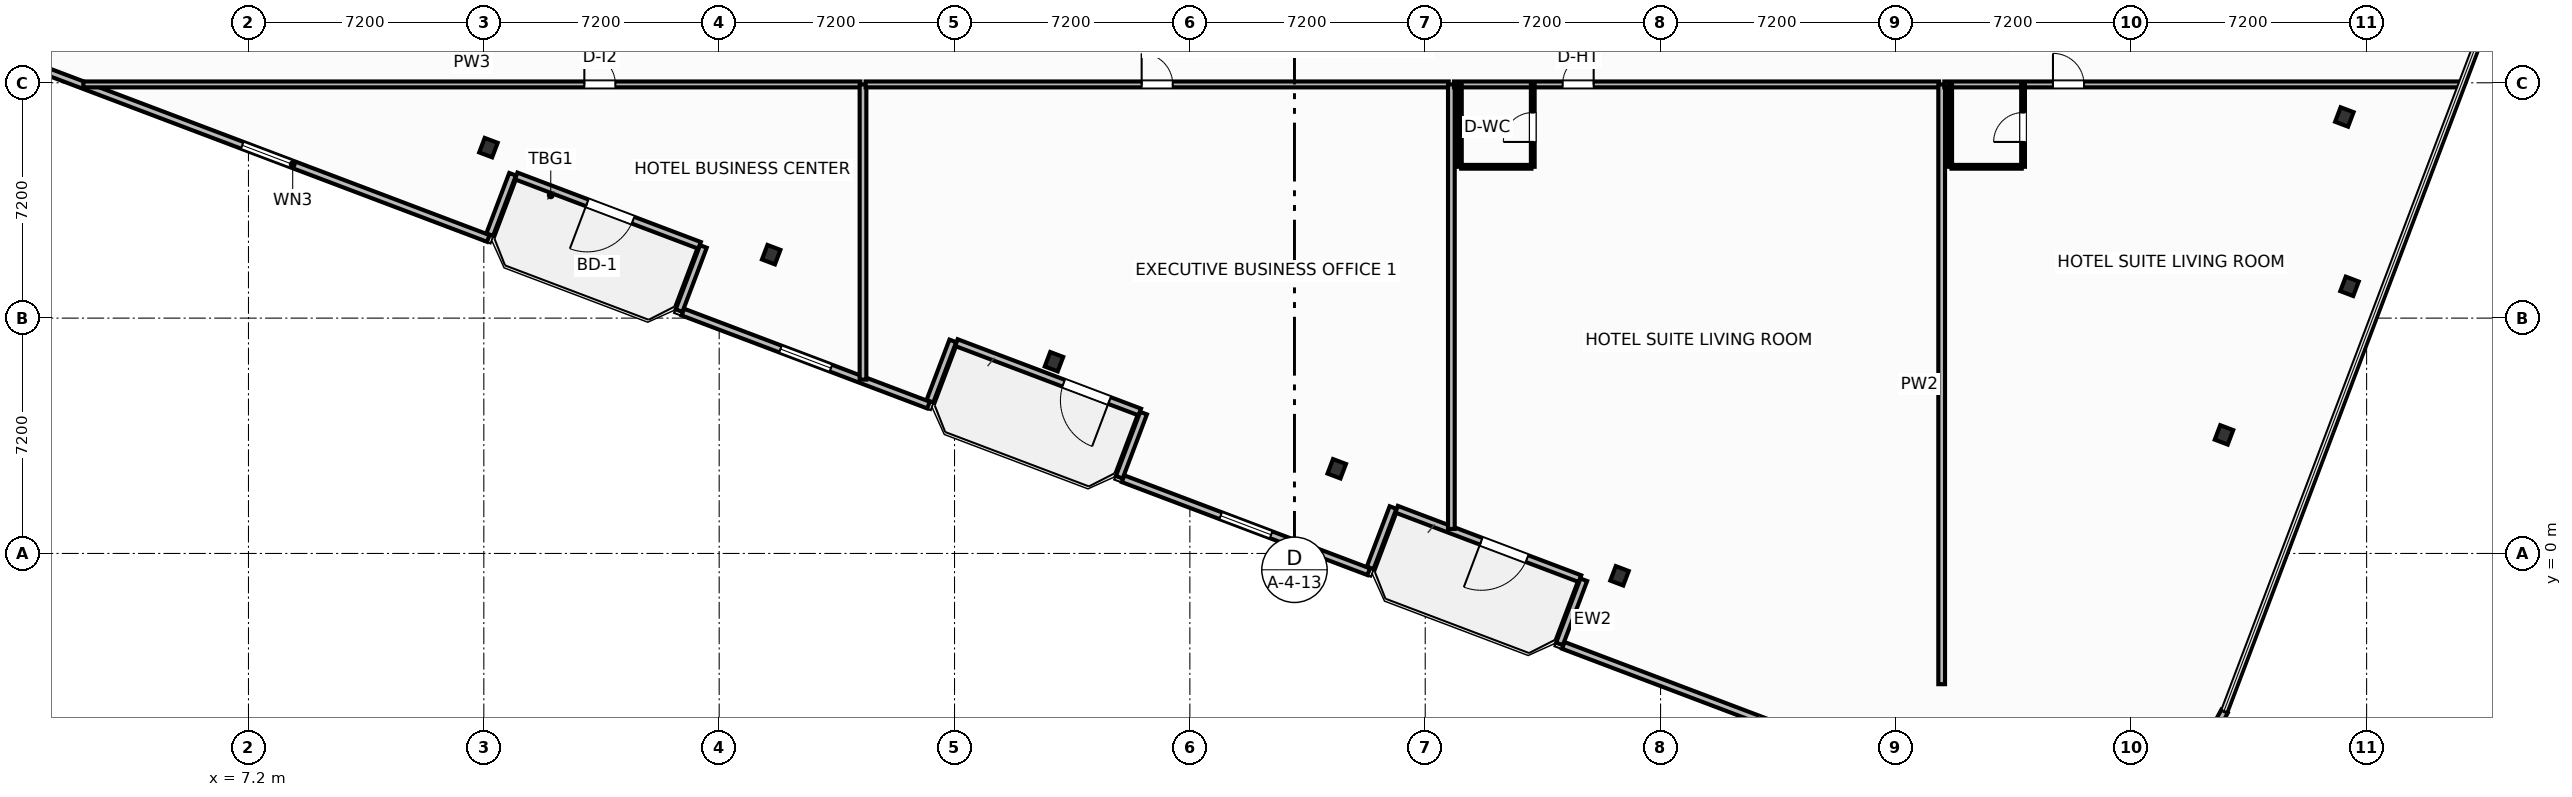
"""IFC4 building model, lengths in metres.
Left out: names, types, materials, properties, quantities, classifications, styles, units other than length and angle.
Written with IfcOpenShell. Run it as: python <this file> out.ifc"""

import sys

from ifc_helpers import new_model, si_unit, direction, frame, frame_2d, origin, origin_2d, place, context, subcontext, project, spatial, rectangle, i_section, extrude, element, fill, save


model = new_model("IFC4")
c1 = context("Model", 3, precision=1e-05, world=origin(), true_north=direction((0.0, 1.0)))
c2 = subcontext(c1, "Body", "Model", "MODEL_VIEW")
j1 = project(units=[si_unit("LENGTHUNIT", "METRE"), si_unit("PLANEANGLEUNIT", "RADIAN")], contexts=[c1])
p1 = place(None, origin())
s1 = spatial("IfcSite", under=j1, at=p1, CompositionType="ELEMENT")
p2 = place(p1, origin())
s2 = spatial("IfcBuilding", under=s1, at=p2, CompositionType="ELEMENT")
p3 = place(p2, frame((0.0, 0.0, 91.0)))
s3 = spatial("IfcBuildingStorey", under=s2, at=p3, CompositionType="ELEMENT", Elevation=91.0)
for number, where, z_axis, x_axis in (
    (1, (14.541, 12.416, 0.0), (0.0, 0.0, 1.0), (0.935, -0.354, 0.0)),
    (2, (23.192, 9.141, 0.0), (0.0, 0.0, 1.0), (0.935, -0.354, 0.0)),
    (3, (31.843, 5.866, 0.0), (0.0, 0.0, 1.0), (0.935, -0.354, 0.0)),
    (4, (40.493, 2.591, 0.0), (0.0, 0.0, 1.0), (0.935, -0.354, 0.0)),
    (5, (49.144, -0.684, 0.0), (0.0, 0.0, 1.0), (0.935, -0.354, 0.0)),
    (6, (67.637, 3.628, 0.0), (0.0, 0.0, 1.0), (0.935, -0.354, 0.0)),
    (7, (71.477, 8.173, 0.0), (0.0, 0.0, 1.0), (0.935, -0.354, 0.0)),
    (8, (71.319, 13.354, 0.0), (0.0, 0.0, 1.0), (0.935, -0.354, 0.0)),
):
    element("IfcColumn", number, at=place(p3, frame(where, z_axis=z_axis, x_axis=x_axis)), inside=s3, PredefinedType="COLUMN", context=c2, shape_type="SweptSolid", body=[
        extrude(i_section(OverallWidth=0.424, OverallDepth=0.474, WebThickness=0.048, FlangeThickness=0.077, FilletRadius=0.025, at=origin_2d()), origin(), (0.0, 0.0, 1.0), 3.7),
    ])
p4 = place(p3, frame((21.0, 9.425, 0.0), z_axis=(0.0, 0.0, 1.0), x_axis=(-0.93521416643, 0.354082565101, 0.0)))
e9 = element("IfcWall", 9, at=p4, inside=s3, PredefinedType="SOLIDWALL", context=c2, shape_type="SweptSolid", body=[
    extrude(rectangle(XDim=6.0, YDim=0.22, at=frame_2d((3.0, 0.0))), origin(), (0.0, 0.0, 1.0), 2.73),
])
p5 = place(p4, frame((2.176, 0.0, 0.0)))
e10 = element("IfcOpeningElement", 10, at=p5, cuts=e9, PredefinedType="OPENING", context=c2, shape_type="SweptSolid", body=[
    extrude(rectangle(XDim=1.5, YDim=2.25, at=frame_2d((0.75, 1.125))), frame((0.0, 0.12, 0.0), z_axis=(0.0, -1.0, 0.0), x_axis=(1.0, 0.0, 0.0)), (0.0, 0.0, 1.0), 0.24),
])
p6 = place(p3, frame((34.468, 4.327, 0.0), z_axis=(0.0, 0.0, 1.0), x_axis=(-0.9352192676, 0.354069091436, 0.0)))
e11 = element("IfcWall", 11, at=p6, inside=s3, PredefinedType="SOLIDWALL", context=c2, shape_type="SweptSolid", body=[
    extrude(rectangle(XDim=6.0, YDim=0.22, at=frame_2d((3.0, 0.0))), origin(), (0.0, 0.0, 1.0), 2.73),
])
p7 = place(p6, frame((0.992, 0.0, 0.0)))
e12 = element("IfcOpeningElement", 12, at=p7, cuts=e11, PredefinedType="OPENING", context=c2, shape_type="SweptSolid", body=[
    extrude(rectangle(XDim=1.5, YDim=2.25, at=frame_2d((0.75, 1.125))), frame((0.0, 0.12, 0.0), z_axis=(0.0, -1.0, 0.0), x_axis=(1.0, 0.0, 0.0)), (0.0, 0.0, 1.0), 0.24),
])
p8 = place(p3, frame((47.935, -0.771, 0.0), z_axis=(0.0, 0.0, 1.0), x_axis=(-0.935227640088, 0.354046976001, 0.0)))
e13 = element("IfcWall", 13, at=p8, inside=s3, PredefinedType="SOLIDWALL", context=c2, shape_type="SweptSolid", body=[
    extrude(rectangle(XDim=6.0, YDim=0.22, at=frame_2d((3.0, 0.0))), origin(), (0.0, 0.0, 1.0), 2.73),
])
p9 = place(p8, frame((1.732, 0.0, 0.0)))
e14 = element("IfcOpeningElement", 14, at=p9, cuts=e13, PredefinedType="OPENING", context=c2, shape_type="SweptSolid", body=[
    extrude(rectangle(XDim=1.5, YDim=2.25, at=frame_2d((0.75, 1.125))), frame((0.0, 0.12, 0.0), z_axis=(0.0, -1.0, 0.0), x_axis=(1.0, 0.0, 0.0)), (0.0, 0.0, 1.0), 0.24),
])
p10 = place(p3, frame((1.026, 14.753, 0.0), z_axis=(0.0, 0.0, 1.0), x_axis=(0.935222448475, -0.354060689526, 0.0)))
e15 = element("IfcWall", 15, at=p10, inside=s3, PredefinedType="SOLIDWALL", context=c2, shape_type="SweptSolid", body=[
    extrude(rectangle(XDim=14.447, YDim=0.22, at=frame_2d((7.224, 0.0))), origin(), (0.0, 0.0, 1.0), 2.73),
])
p11 = place(p10, frame((6.399, 0.0, 0.8)))
e16 = element("IfcOpeningElement", 16, at=p11, cuts=e15, PredefinedType="OPENING", context=c2, shape_type="SweptSolid", body=[
    extrude(rectangle(XDim=1.65, YDim=1.65, at=frame_2d((0.825, 0.825))), frame((0.0, 0.12, 0.0), z_axis=(0.0, -1.0, 0.0), x_axis=(1.0, 0.0, 0.0)), (0.0, 0.0, 1.0), 0.24),
])
p12 = place(p3, frame((14.581, 9.755, 0.0), z_axis=(0.0, 0.0, 1.0), x_axis=(0.354061611705, 0.935222099352, 0.0)))
e17 = element("IfcWall", 17, at=p12, inside=s3, PredefinedType="SOLIDWALL", context=c2, shape_type="SweptSolid", body=[
    extrude(rectangle(XDim=1.975, YDim=0.22, at=frame_2d((0.987, 0.0))), origin(), (0.0, 0.0, 1.0), 2.73),
])
p13 = place(p3, frame((21.116, 9.392, 0.0), z_axis=(0.0, 0.0, 1.0), x_axis=(-0.353988291547, -0.935249854022, 0.0)))
e18 = element("IfcWall", 18, at=p13, inside=s3, PredefinedType="SOLIDWALL", context=c2, shape_type="SweptSolid", body=[
    extrude(rectangle(XDim=2.1, YDim=0.22, at=frame_2d((1.05, 0.0))), origin(), (0.0, 0.0, 1.0), 2.73),
])
p14 = place(p3, frame((20.49, 7.384, 0.0), z_axis=(0.0, 0.0, 1.0), x_axis=(0.935230796934, -0.354038636968, 0.0)))
e19 = element("IfcWall", 19, at=p14, inside=s3, PredefinedType="SOLIDWALL", context=c2, shape_type="SweptSolid", body=[
    extrude(rectangle(XDim=8.035, YDim=0.22, at=frame_2d((4.018, 0.0))), origin(), (0.0, 0.0, 1.0), 2.73),
])
p15 = place(p14, frame((3.192, 0.0, 0.8)))
e20 = element("IfcOpeningElement", 20, at=p15, cuts=e19, PredefinedType="OPENING", context=c2, shape_type="SweptSolid", body=[
    extrude(rectangle(XDim=1.65, YDim=1.65, at=frame_2d((0.825, 0.825))), frame((0.0, 0.12, 0.0), z_axis=(0.0, -1.0, 0.0), x_axis=(1.0, 0.0, 0.0)), (0.0, 0.0, 1.0), 0.24),
])
p16 = place(p3, frame((28.048, 4.656, 0.0), z_axis=(0.0, 0.0, 1.0), x_axis=(0.354128791944, 0.935196663123, 0.0)))
e21 = element("IfcWall", 21, at=p16, inside=s3, PredefinedType="SOLIDWALL", context=c2, shape_type="SweptSolid", body=[
    extrude(rectangle(XDim=1.975, YDim=0.22, at=frame_2d((0.988, 0.0))), origin(), (0.0, 0.0, 1.0), 2.73),
])
p17 = place(p3, frame((34.583, 4.294, 0.0), z_axis=(0.0, 0.0, 1.0), x_axis=(-0.354128469405, -0.935196785258, 0.0)))
e22 = element("IfcWall", 22, at=p17, inside=s3, PredefinedType="SOLIDWALL", context=c2, shape_type="SweptSolid", body=[
    extrude(rectangle(XDim=2.1, YDim=0.22, at=frame_2d((1.05, 0.0))), origin(), (0.0, 0.0, 1.0), 2.73),
])
p18 = place(p3, frame((33.957, 2.286, 0.0), z_axis=(0.0, 0.0, 1.0), x_axis=(0.935220736163, -0.354065212427, 0.0)))
e23 = element("IfcWall", 23, at=p18, inside=s3, PredefinedType="SOLIDWALL", context=c2, shape_type="SweptSolid", body=[
    extrude(rectangle(XDim=8.035, YDim=0.22, at=frame_2d((4.018, 0.0))), origin(), (0.0, 0.0, 1.0), 2.73),
])
p19 = place(p18, frame((3.192, 0.0, 0.8)))
e24 = element("IfcOpeningElement", 24, at=p19, cuts=e23, PredefinedType="OPENING", context=c2, shape_type="SweptSolid", body=[
    extrude(rectangle(XDim=1.65, YDim=1.65, at=frame_2d((0.825, 0.825))), frame((0.0, 0.12, 0.0), z_axis=(0.0, -1.0, 0.0), x_axis=(1.0, 0.0, 0.0)), (0.0, 0.0, 1.0), 0.24),
])
p20 = place(p3, frame((41.516, -0.442, 0.0), z_axis=(0.0, 0.0, 1.0), x_axis=(0.354061611705, 0.935222099352, 0.0)))
e25 = element("IfcWall", 25, at=p20, inside=s3, PredefinedType="SOLIDWALL", context=c2, shape_type="SweptSolid", body=[
    extrude(rectangle(XDim=1.975, YDim=0.22, at=frame_2d((0.987, 0.0))), origin(), (0.0, 0.0, 1.0), 2.73),
])
p21 = place(p3, frame((48.051, -0.805, 0.0), z_axis=(0.0, 0.0, 1.0), x_axis=(-0.353988291547, -0.935249854022, 0.0)))
e26 = element("IfcWall", 26, at=p21, inside=s3, PredefinedType="SOLIDWALL", context=c2, shape_type="SweptSolid", body=[
    extrude(rectangle(XDim=2.1, YDim=0.22, at=frame_2d((1.05, 0.0))), origin(), (0.0, 0.0, 1.0), 2.73),
])
p22 = place(p3, frame((47.424, -2.813, 0.0), z_axis=(0.0, 0.0, 1.0), x_axis=(0.935225962032, -0.354051408614, 0.0)))
e27 = element("IfcWall", 27, at=p22, inside=s3, PredefinedType="SOLIDWALL", context=c2, shape_type="SweptSolid", body=[
    extrude(rectangle(XDim=14.347, YDim=0.22, at=frame_2d((7.173, 0.0))), origin(), (0.0, 0.0, 1.0), 2.73),
])
p23 = place(p22, frame((6.348, 0.0, 0.8)))
e28 = element("IfcOpeningElement", 28, at=p23, cuts=e27, PredefinedType="OPENING", context=c2, shape_type="SweptSolid", body=[
    extrude(rectangle(XDim=1.65, YDim=1.65, at=frame_2d((0.825, 0.825))), frame((0.0, 0.12, 0.0), z_axis=(0.0, -1.0, 0.0), x_axis=(1.0, 0.0, 0.0)), (0.0, 0.0, 1.0), 0.24),
])
p24 = place(p3, frame((67.015, -6.019, 0.0), z_axis=(0.0, 0.0, 1.0), x_axis=(0.473077364598, 0.881020889142, 0.0)))
e29 = element("IfcWall", 29, at=p24, inside=s3, PredefinedType="SOLIDWALL", context=c2, shape_type="SweptSolid", body=[
    extrude(rectangle(XDim=1.353, YDim=0.22, at=frame_2d((0.677, 0.0))), origin(), (0.0, 0.0, 1.0), 2.73),
])
p25 = place(p3, frame((2.146, 14.35, 0.0), z_axis=(0.0, 0.0, 1.0), x_axis=(1.0, 0.0, 0.0)))
e30 = element("IfcWall", 30, at=p25, inside=s3, PredefinedType="PARTITIONING", context=c2, shape_type="SweptSolid", body=[
    extrude(rectangle(XDim=23.774, YDim=0.18, at=frame_2d((11.887, 0.0))), origin(), (0.0, 0.0, 1.0), 3.45),
])
p26 = place(p25, frame((15.329, 0.0, 0.0)))
e31 = element("IfcOpeningElement", 31, at=p26, cuts=e30, PredefinedType="OPENING", context=c2, shape_type="SweptSolid", body=[
    extrude(rectangle(XDim=0.95, YDim=2.05, at=frame_2d((0.475, 1.025))), frame((0.0, 0.1, 0.0), z_axis=(0.0, -1.0, 0.0), x_axis=(1.0, 0.0, 0.0)), (0.0, 0.0, 1.0), 0.2),
])
p27 = place(p3, frame((26.0, 5.319, 0.0), z_axis=(0.0, 0.0, 1.0), x_axis=(0.0, 1.0, 0.0)))
e32 = element("IfcWall", 32, at=p27, inside=s3, PredefinedType="PARTITIONING", context=c2, shape_type="SweptSolid", body=[
    extrude(rectangle(XDim=9.031, YDim=0.205, at=frame_2d((4.515, 0.0))), origin(), (0.0, 0.0, 1.0), 3.45),
])
p28 = place(p3, frame((26.08, 14.35, 0.0), z_axis=(0.0, 0.0, 1.0), x_axis=(1.0, 0.0, 0.0)))
e33 = element("IfcWall", 33, at=p28, inside=s3, PredefinedType="PARTITIONING", context=c2, shape_type="SweptSolid", body=[
    extrude(rectangle(XDim=17.84, YDim=0.18, at=frame_2d((8.92, 0.0))), origin(), (0.0, 0.0, 1.0), 3.45),
])
p29 = place(p28, frame((8.445, 0.0, 0.0)))
e34 = element("IfcOpeningElement", 34, at=p29, cuts=e33, PredefinedType="OPENING", context=c2, shape_type="SweptSolid", body=[
    extrude(rectangle(XDim=0.95, YDim=2.05, at=frame_2d((0.475, 1.025))), frame((0.0, 0.1, 0.0), z_axis=(0.0, -1.0, 0.0), x_axis=(1.0, 0.0, 0.0)), (0.0, 0.0, 1.0), 0.2),
])
p30 = place(p3, frame((44.0, 0.75, 0.0), z_axis=(0.0, 0.0, 1.0), x_axis=(0.0, 1.0, 0.0)))
e35 = element("IfcWall", 35, at=p30, inside=s3, PredefinedType="PARTITIONING", context=c2, shape_type="SweptSolid", body=[
    extrude(rectangle(XDim=13.6, YDim=0.205, at=frame_2d((6.8, 0.0))), origin(), (0.0, 0.0, 1.0), 3.45),
])
p31 = place(p3, frame((44.08, 14.35, 0.0), z_axis=(0.0, 0.0, 1.0), x_axis=(1.0, 0.0, 0.0)))
e36 = element("IfcWall", 36, at=p31, inside=s3, PredefinedType="PARTITIONING", context=c2, shape_type="SweptSolid", body=[
    extrude(rectangle(XDim=14.84, YDim=0.18, at=frame_2d((7.42, 0.0))), origin(), (0.0, 0.0, 1.0), 3.45),
])
p32 = place(p31, frame((3.323, 0.0, 0.0)))
e37 = element("IfcOpeningElement", 37, at=p32, cuts=e36, PredefinedType="OPENING", context=c2, shape_type="SweptSolid", body=[
    extrude(rectangle(XDim=0.95, YDim=2.15, at=frame_2d((0.475, 1.075))), frame((0.0, 0.1, 0.0), z_axis=(0.0, -1.0, 0.0), x_axis=(1.0, 0.0, 0.0)), (0.0, 0.0, 1.0), 0.2),
])
p33 = place(p3, frame((44.3, 11.83, 0.0), z_axis=(0.0, 0.0, 1.0), x_axis=(1.0, 0.0, 0.0)))
e38 = element("IfcWall", 38, at=p33, inside=s3, PredefinedType="PARTITIONING", context=c2, shape_type="SweptSolid", body=[
    extrude(rectangle(XDim=2.15, YDim=0.115, at=frame_2d((1.075, 0.0))), origin(), (0.0, 0.0, 1.0), 3.45),
])
p34 = place(p3, frame((46.49, 11.83, 0.0), z_axis=(0.0, 0.0, 1.0), x_axis=(0.0, 1.0, 0.0)))
e39 = element("IfcWall", 39, at=p34, inside=s3, PredefinedType="PARTITIONING", context=c2, shape_type="SweptSolid", body=[
    extrude(rectangle(XDim=2.52, YDim=0.115, at=frame_2d((1.26, 0.0))), origin(), (0.0, 0.0, 1.0), 3.45),
])
p35 = place(p34, frame((0.76, 0.0, 0.0)))
e40 = element("IfcOpeningElement", 40, at=p35, cuts=e39, PredefinedType="OPENING", context=c2, shape_type="SweptSolid", body=[
    extrude(rectangle(XDim=0.9, YDim=2.05, at=frame_2d((0.45, 1.025))), frame((0.0, 0.067, 0.0), z_axis=(0.0, -1.0, 0.0), x_axis=(1.0, 0.0, 0.0)), (0.0, 0.0, 1.0), 0.135),
])
p36 = place(p3, frame((44.26, 11.83, 0.0), z_axis=(0.0, 0.0, 1.0), x_axis=(0.0, 1.0, 0.0)))
e41 = element("IfcWall", 41, at=p36, inside=s3, PredefinedType="PARTITIONING", context=c2, shape_type="SweptSolid", body=[
    extrude(rectangle(XDim=2.52, YDim=0.115, at=frame_2d((1.26, 0.0))), origin(), (0.0, 0.0, 1.0), 3.45),
])
p37 = place(p3, frame((59.0, -4.0, 0.0), z_axis=(0.0, 0.0, 1.0), x_axis=(0.0, 1.0, 0.0)))
e42 = element("IfcWall", 42, at=p37, inside=s3, PredefinedType="PARTITIONING", context=c2, shape_type="SweptSolid", body=[
    extrude(rectangle(XDim=18.35, YDim=0.205, at=frame_2d((9.175, 0.0))), origin(), (0.0, 0.0, 1.0), 3.45),
])
p38 = place(p3, frame((59.08, 14.35, 0.0), z_axis=(0.0, 0.0, 1.0), x_axis=(1.0, 0.0, 0.0)))
e43 = element("IfcWall", 43, at=p38, inside=s3, PredefinedType="PARTITIONING", context=c2, shape_type="SweptSolid", body=[
    extrude(rectangle(XDim=15.775, YDim=0.18, at=frame_2d((7.888, 0.0))), origin(), (0.0, 0.0, 1.0), 2.58),
])
p39 = place(p38, frame((3.324, 0.0, 0.0)))
e44 = element("IfcOpeningElement", 44, at=p39, cuts=e43, PredefinedType="OPENING", context=c2, shape_type="SweptSolid", body=[
    extrude(rectangle(XDim=0.95, YDim=2.15, at=frame_2d((0.475, 1.075))), frame((0.0, 0.1, 0.0), z_axis=(0.0, -1.0, 0.0), x_axis=(1.0, 0.0, 0.0)), (0.0, 0.0, 1.0), 0.2),
])
p40 = place(p3, frame((59.3, 11.83, 0.0), z_axis=(0.0, 0.0, 1.0), x_axis=(1.0, 0.0, 0.0)))
e45 = element("IfcWall", 45, at=p40, inside=s3, PredefinedType="PARTITIONING", context=c2, shape_type="SweptSolid", body=[
    extrude(rectangle(XDim=2.15, YDim=0.115, at=frame_2d((1.075, 0.0))), origin(), (0.0, 0.0, 1.0), 3.45),
])
p41 = place(p3, frame((61.49, 11.83, 0.0), z_axis=(0.0, 0.0, 1.0), x_axis=(0.0, 1.0, 0.0)))
e46 = element("IfcWall", 46, at=p41, inside=s3, PredefinedType="PARTITIONING", context=c2, shape_type="SweptSolid", body=[
    extrude(rectangle(XDim=2.52, YDim=0.115, at=frame_2d((1.26, 0.0))), origin(), (0.0, 0.0, 1.0), 3.45),
])
p42 = place(p41, frame((0.76, 0.0, 0.0)))
e47 = element("IfcOpeningElement", 47, at=p42, cuts=e46, PredefinedType="OPENING", context=c2, shape_type="SweptSolid", body=[
    extrude(rectangle(XDim=0.9, YDim=2.05, at=frame_2d((0.45, 1.025))), frame((0.0, 0.067, 0.0), z_axis=(0.0, -1.0, 0.0), x_axis=(1.0, 0.0, 0.0)), (0.0, 0.0, 1.0), 0.135),
])
p43 = place(p3, frame((59.26, 11.83, 0.0), z_axis=(0.0, 0.0, 1.0), x_axis=(0.0, 1.0, 0.0)))
e48 = element("IfcWall", 48, at=p43, inside=s3, PredefinedType="PARTITIONING", context=c2, shape_type="SweptSolid", body=[
    extrude(rectangle(XDim=2.52, YDim=0.115, at=frame_2d((1.26, 0.0))), origin(), (0.0, 0.0, 1.0), 3.45),
])
p44 = place(p5, origin())
e49 = element("IfcDoor", 49, at=p44, inside=s3, OperationType="SINGLE_SWING_RIGHT", PredefinedType="DOOR", context=c2, shape_type="SweptSolid", body=[
    extrude(rectangle(XDim=1.5, YDim=2.25, at=frame_2d((0.75, 1.125))), frame((0.0, 0.025, 0.0), z_axis=(0.0, -1.0, 0.0), x_axis=(1.0, 0.0, 0.0)), (0.0, 0.0, 1.0), 0.05),
])
fill(e10, e49)
p45 = place(p7, origin())
e50 = element("IfcDoor", 50, at=p45, inside=s3, OperationType="SINGLE_SWING_LEFT", PredefinedType="DOOR", context=c2, shape_type="SweptSolid", body=[
    extrude(rectangle(XDim=1.5, YDim=2.25, at=frame_2d((0.75, 1.125))), frame((0.0, 0.025, 0.0), z_axis=(0.0, -1.0, 0.0), x_axis=(1.0, 0.0, 0.0)), (0.0, 0.0, 1.0), 0.05),
])
fill(e12, e50)
p46 = place(p9, origin())
e51 = element("IfcDoor", 51, at=p46, inside=s3, OperationType="SINGLE_SWING_RIGHT", PredefinedType="DOOR", context=c2, shape_type="SweptSolid", body=[
    extrude(rectangle(XDim=1.5, YDim=2.25, at=frame_2d((0.75, 1.125))), frame((0.0, 0.025, 0.0), z_axis=(0.0, -1.0, 0.0), x_axis=(1.0, 0.0, 0.0)), (0.0, 0.0, 1.0), 0.05),
])
fill(e14, e51)
p47 = place(p11, origin())
e52 = element("IfcWindow", 52, at=p47, inside=s3, PartitioningType="SINGLE_PANEL", PredefinedType="WINDOW", context=c2, shape_type="SweptSolid", body=[
    extrude(rectangle(XDim=1.65, YDim=1.65, at=frame_2d((0.825, 0.825))), frame((0.0, 0.03, 0.0), z_axis=(0.0, -1.0, 0.0), x_axis=(1.0, 0.0, 0.0)), (0.0, 0.0, 1.0), 0.06),
])
fill(e16, e52)
p48 = place(p15, origin())
e53 = element("IfcWindow", 53, at=p48, inside=s3, PartitioningType="SINGLE_PANEL", PredefinedType="WINDOW", context=c2, shape_type="SweptSolid", body=[
    extrude(rectangle(XDim=1.65, YDim=1.65, at=frame_2d((0.825, 0.825))), frame((0.0, 0.03, 0.0), z_axis=(0.0, -1.0, 0.0), x_axis=(1.0, 0.0, 0.0)), (0.0, 0.0, 1.0), 0.06),
])
fill(e20, e53)
p49 = place(p19, origin())
e54 = element("IfcWindow", 54, at=p49, inside=s3, PartitioningType="SINGLE_PANEL", PredefinedType="WINDOW", context=c2, shape_type="SweptSolid", body=[
    extrude(rectangle(XDim=1.65, YDim=1.65, at=frame_2d((0.825, 0.825))), frame((0.0, 0.03, 0.0), z_axis=(0.0, -1.0, 0.0), x_axis=(1.0, 0.0, 0.0)), (0.0, 0.0, 1.0), 0.06),
])
fill(e24, e54)
p50 = place(p26, origin())
e55 = element("IfcDoor", 55, at=p50, inside=s3, OperationType="SINGLE_SWING_LEFT", PredefinedType="DOOR", context=c2, shape_type="SweptSolid", body=[
    extrude(rectangle(XDim=0.95, YDim=2.05, at=frame_2d((0.475, 1.025))), frame((0.0, 0.025, 0.0), z_axis=(0.0, -1.0, 0.0), x_axis=(1.0, 0.0, 0.0)), (0.0, 0.0, 1.0), 0.05),
])
fill(e31, e55)
p51 = place(p29, origin())
e56 = element("IfcDoor", 56, at=p51, inside=s3, OperationType="SINGLE_SWING_LEFT", PredefinedType="DOOR", context=c2, shape_type="SweptSolid", body=[
    extrude(rectangle(XDim=0.95, YDim=2.05, at=frame_2d((0.475, 1.025))), frame((0.0, 0.025, 0.0), z_axis=(0.0, -1.0, 0.0), x_axis=(1.0, 0.0, 0.0)), (0.0, 0.0, 1.0), 0.05),
])
fill(e34, e56)
p52 = place(p32, origin())
e57 = element("IfcDoor", 57, at=p52, inside=s3, OperationType="SINGLE_SWING_RIGHT", PredefinedType="DOOR", context=c2, shape_type="SweptSolid", body=[
    extrude(rectangle(XDim=0.95, YDim=2.15, at=frame_2d((0.475, 1.075))), frame((0.0, 0.025, 0.0), z_axis=(0.0, -1.0, 0.0), x_axis=(1.0, 0.0, 0.0)), (0.0, 0.0, 1.0), 0.05),
])
fill(e37, e57)
p53 = place(p35, origin())
e58 = element("IfcDoor", 58, at=p53, inside=s3, OperationType="SINGLE_SWING_LEFT", PredefinedType="DOOR", context=c2, shape_type="SweptSolid", body=[
    extrude(rectangle(XDim=0.9, YDim=2.05, at=frame_2d((0.45, 1.025))), frame((0.0, 0.025, 0.0), z_axis=(0.0, -1.0, 0.0), x_axis=(1.0, 0.0, 0.0)), (0.0, 0.0, 1.0), 0.05),
])
fill(e40, e58)
p54 = place(p39, origin())
e59 = element("IfcDoor", 59, at=p54, inside=s3, OperationType="SINGLE_SWING_LEFT", PredefinedType="DOOR", context=c2, shape_type="SweptSolid", body=[
    extrude(rectangle(XDim=0.95, YDim=2.15, at=frame_2d((0.475, 1.075))), frame((0.0, 0.025, 0.0), z_axis=(0.0, -1.0, 0.0), x_axis=(1.0, 0.0, 0.0)), (0.0, 0.0, 1.0), 0.05),
])
fill(e44, e59)
p55 = place(p42, origin())
e60 = element("IfcDoor", 60, at=p55, inside=s3, OperationType="SINGLE_SWING_LEFT", PredefinedType="DOOR", context=c2, shape_type="SweptSolid", body=[
    extrude(rectangle(XDim=0.9, YDim=2.05, at=frame_2d((0.45, 1.025))), frame((0.0, 0.025, 0.0), z_axis=(0.0, -1.0, 0.0), x_axis=(1.0, 0.0, 0.0)), (0.0, 0.0, 1.0), 0.05),
])
fill(e47, e60)
save(model, sys.argv[1])
